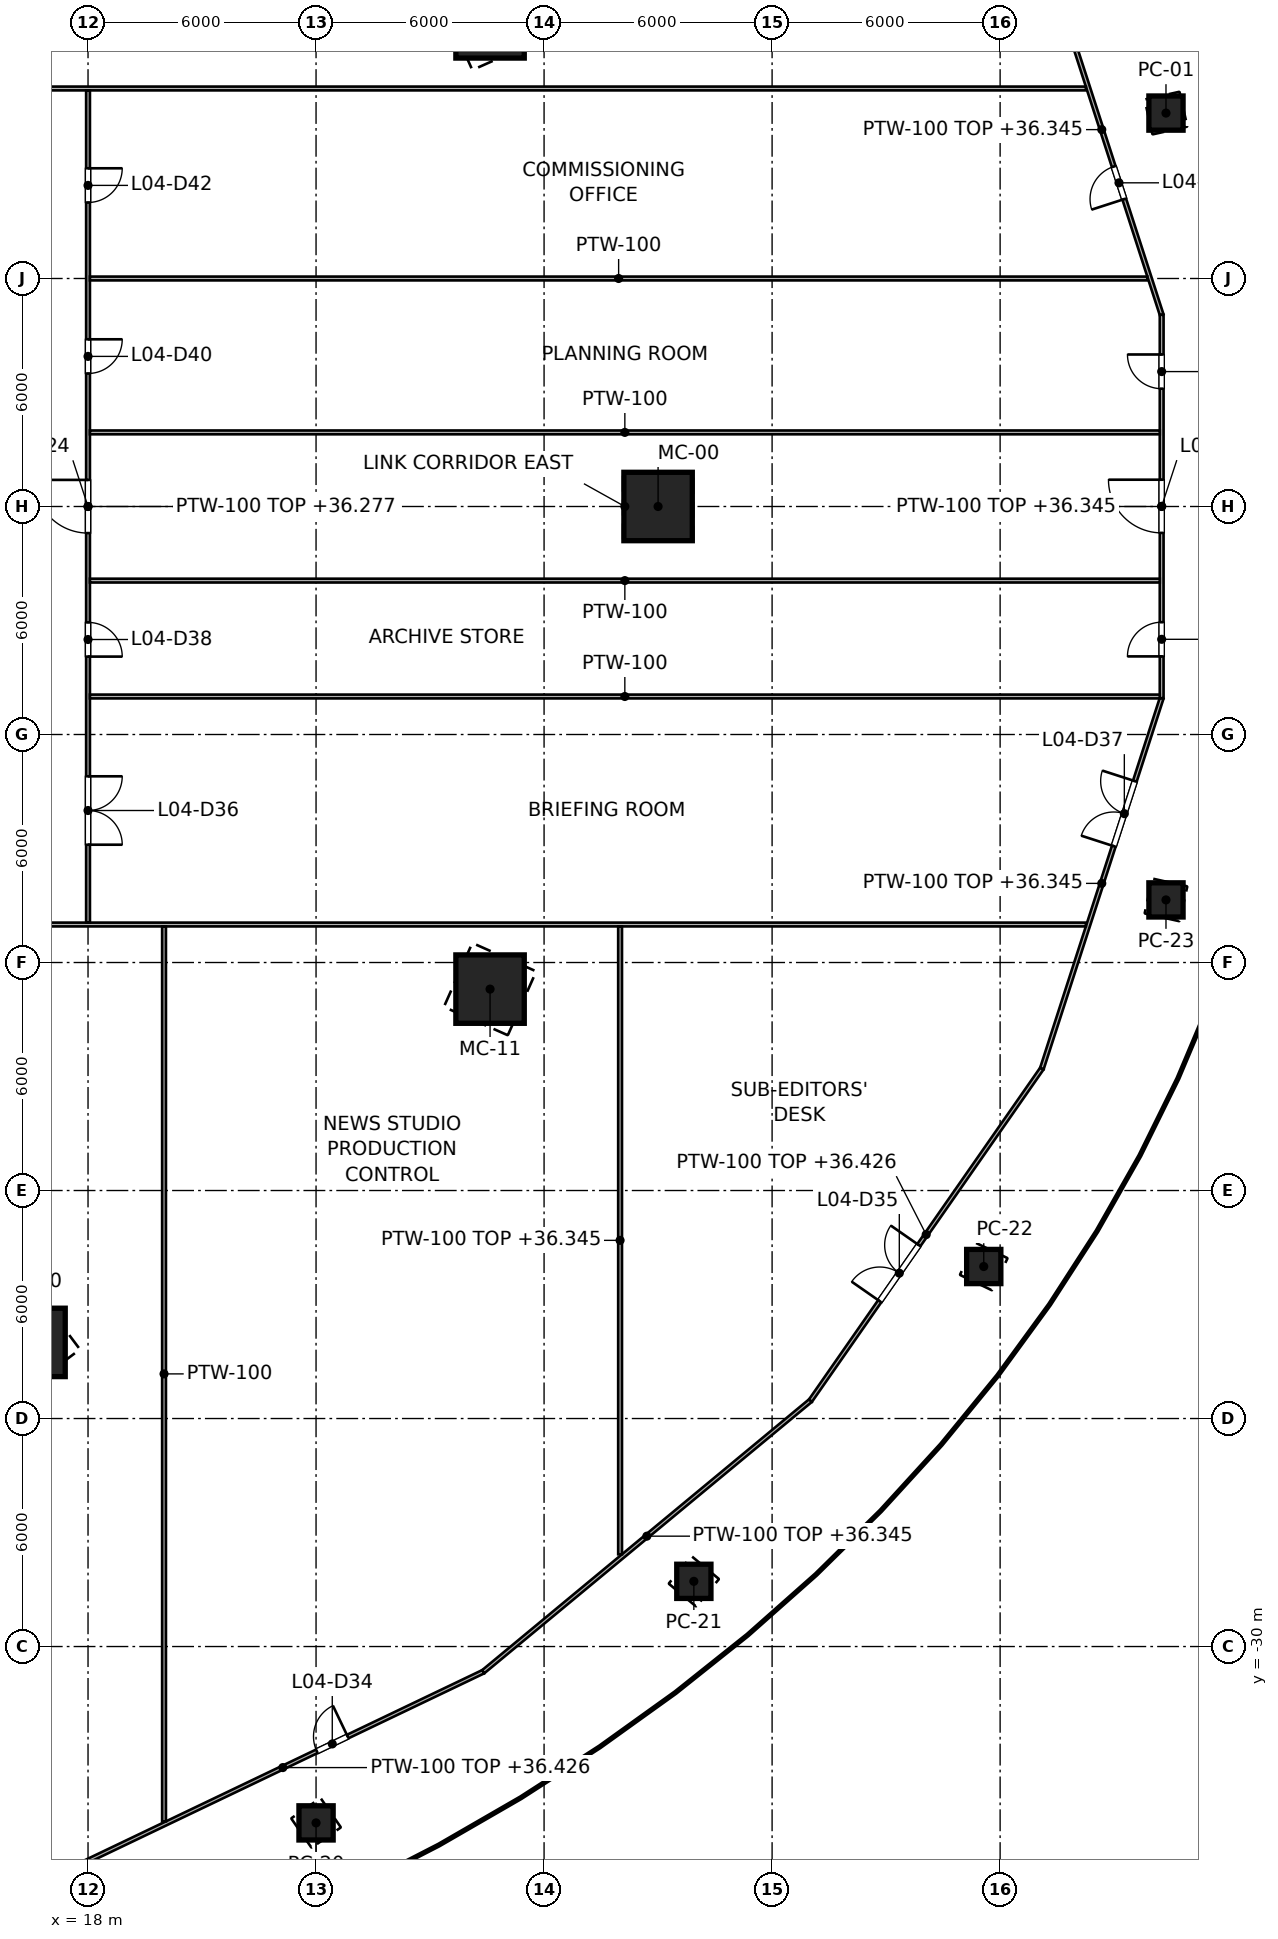
"""IFC4 building model, lengths in metres.
Left out: names, types, materials, properties, quantities, classifications, styles, units other than length and angle.
Written with IfcOpenShell. Run it as: python <this file> out.ifc"""

import sys

from ifc_helpers import new_model, si_unit, direction, frame, frame_2d, origin, origin_2d, place, context, subcontext, project, spatial, rectangle, hollow_rectangle, extrude, element, fill, save


model = new_model("IFC4")
c1 = context("Model", 3, precision=1e-05, world=origin(), true_north=direction((0.0, 1.0)))
c2 = subcontext(c1, "Body", "Model", "MODEL_VIEW")
j1 = project(units=[si_unit("LENGTHUNIT", "METRE"), si_unit("PLANEANGLEUNIT", "RADIAN")], contexts=[c1])
p1 = place(None, origin())
s1 = spatial("IfcSite", under=j1, at=p1, CompositionType="ELEMENT")
p2 = place(p1, origin())
s2 = spatial("IfcBuilding", under=s1, at=p2, CompositionType="ELEMENT")
p3 = place(p2, frame((0.0, 0.0, 31.4)))
s3 = spatial("IfcBuildingStorey", under=s2, at=p3, CompositionType="ELEMENT", Elevation=31.4)
for number, where, z_axis, x_axis in (
    (1, (33.0, 0.0, 0.0), (0.0, 0.0, 1.0), (1.0, 0.0, 0.0)),
    (2, (28.579, 12.7, 0.0), (0.0, 0.0, 1.0), (0.914, 0.406, 0.0)),
    (3, (16.5, -21.997, 0.0), (0.0, 0.0, 1.0), (0.6, -0.8, 0.0)),
    (4, (28.579, -12.7, 0.0), (0.0, 0.0, 1.0), (0.914, -0.406, 0.0)),
):
    element("IfcColumn", number, at=place(p3, frame(where, z_axis=z_axis, x_axis=x_axis)), inside=s3, PredefinedType="COLUMN", context=c2, shape_type="SweptSolid", body=[
        extrude(hollow_rectangle(XDim=1.8, YDim=1.8, WallThickness=0.08, at=origin_2d()), origin(), (0.0, 0.0, 1.0), 6.0),
    ])
for number, where, z_axis, x_axis in (
    (5, (46.365, 10.353, 0.0), (0.0, 0.0, 1.0), (0.976, 0.218, 0.0)),
    (6, (24.0, -34.641, 0.0), (0.0, 0.0, 1.0), (0.569, -0.822, 0.0)),
    (7, (33.941, -28.284, 0.0), (0.0, 0.0, 1.0), (0.768, -0.64, 0.0)),
    (8, (41.569, -20.0, 0.0), (0.0, 0.0, 1.0), (0.901, -0.434, 0.0)),
    (9, (46.365, -10.353, 0.0), (0.0, 0.0, 1.0), (0.976, -0.218, 0.0)),
):
    element("IfcColumn", number, at=place(p3, frame(where, z_axis=z_axis, x_axis=x_axis)), inside=s3, PredefinedType="COLUMN", context=c2, shape_type="SweptSolid", body=[
        extrude(hollow_rectangle(XDim=0.9, YDim=0.9, WallThickness=0.04, at=origin_2d()), origin(), (0.0, 0.0, 1.0), 6.0),
    ])
p4 = place(p3, frame((46.251, 5.045, 0.0), z_axis=(0.0, 0.0, 1.0), x_axis=(-0.307713034182, 0.951479210805, 0.0)))
e10 = element("IfcWall", 10, at=p4, inside=s3, PredefinedType="PARTITIONING", context=c2, shape_type="SweptSolid", body=[
    extrude(rectangle(XDim=10.243, YDim=0.1, at=frame_2d((5.122, 0.0))), origin(), (0.0, 0.0, 1.0), 4.945),
])
p5 = place(p4, frame((3.2, 0.0, 0.0)))
e11 = element("IfcOpeningElement", 11, at=p5, cuts=e10, PredefinedType="OPENING", context=c2, shape_type="SweptSolid", body=[
    extrude(rectangle(XDim=0.9, YDim=2.1, at=frame_2d((0.45, 1.05))), frame((0.0, 0.05, 0.0), z_axis=(0.0, -1.0, 0.0), x_axis=(1.0, 0.0, 0.0)), (0.0, 0.0, 1.0), 0.1),
])
p6 = place(p3, frame((17.852, -35.708, 0.0), z_axis=(0.0, 0.0, 1.0), x_axis=(0.902100999032, 0.431524955878, 0.0)))
e12 = element("IfcWall", 12, at=p6, inside=s3, PredefinedType="PARTITIONING", context=c2, shape_type="SweptSolid", body=[
    extrude(rectangle(XDim=11.691, YDim=0.1, at=frame_2d((5.845, 0.0))), origin(), (0.0, 0.0, 1.0), 5.026),
])
p7 = place(p6, frame((6.838, 0.0, 0.0)))
e13 = element("IfcOpeningElement", 13, at=p7, cuts=e12, PredefinedType="OPENING", context=c2, shape_type="SweptSolid", body=[
    extrude(rectangle(XDim=0.9, YDim=2.1, at=frame_2d((0.45, 1.05))), frame((0.0, 0.05, 0.0), z_axis=(0.0, -1.0, 0.0), x_axis=(1.0, 0.0, 0.0)), (0.0, 0.0, 1.0), 0.1),
])
p8 = place(p3, frame((28.399, -30.663, 0.0), z_axis=(0.0, 0.0, 1.0), x_axis=(0.770046995363, 0.637987166746, 0.0)))
e14 = element("IfcWall", 14, at=p8, inside=s3, PredefinedType="PARTITIONING", context=c2, shape_type="SweptSolid", body=[
    extrude(rectangle(XDim=11.183, YDim=0.1, at=frame_2d((5.591, 0.0))), origin(), (0.0, 0.0, 1.0), 4.945),
])
p9 = place(p3, frame((37.01, -23.529, 0.0), z_axis=(0.0, 0.0, 1.0), x_axis=(0.571737958261, 0.820436290692, 0.0)))
e15 = element("IfcWall", 15, at=p9, inside=s3, PredefinedType="PARTITIONING", context=c2, shape_type="SweptSolid", body=[
    extrude(rectangle(XDim=10.65, YDim=0.1, at=frame_2d((5.325, 0.0))), origin(), (0.0, 0.0, 1.0), 5.026),
])
p10 = place(p9, frame((3.188, 0.0, 0.0)))
e16 = element("IfcOpeningElement", 16, at=p10, cuts=e15, PredefinedType="OPENING", context=c2, shape_type="SweptSolid", body=[
    extrude(rectangle(XDim=1.8, YDim=2.1, at=frame_2d((0.9, 1.05))), frame((0.0, 0.05, 0.0), z_axis=(0.0, -1.0, 0.0), x_axis=(1.0, 0.0, 0.0)), (0.0, 0.0, 1.0), 0.1),
])
p11 = place(p3, frame((43.099, -14.791, 0.0), z_axis=(0.0, 0.0, 1.0), x_axis=(0.307713034182, 0.951479210805, 0.0)))
e17 = element("IfcWall", 17, at=p11, inside=s3, PredefinedType="PARTITIONING", context=c2, shape_type="SweptSolid", body=[
    extrude(rectangle(XDim=10.243, YDim=0.1, at=frame_2d((5.122, 0.0))), origin(), (0.0, 0.0, 1.0), 4.945),
])
p12 = place(p11, frame((6.15, 0.0, 0.0)))
e18 = element("IfcOpeningElement", 18, at=p12, cuts=e17, PredefinedType="OPENING", context=c2, shape_type="SweptSolid", body=[
    extrude(rectangle(XDim=1.8, YDim=2.1, at=frame_2d((0.9, 1.05))), frame((0.0, 0.05, 0.0), z_axis=(0.0, -1.0, 0.0), x_axis=(1.0, 0.0, 0.0)), (0.0, 0.0, 1.0), 0.1),
])
p13 = place(p3, frame((46.251, -5.045, 0.0), z_axis=(0.0, 0.0, 1.0), x_axis=(0.0, 1.0, 0.0)))
e19 = element("IfcWall", 19, at=p13, inside=s3, PredefinedType="PARTITIONING", context=c2, shape_type="SweptSolid", body=[
    extrude(rectangle(XDim=10.09, YDim=0.1, at=frame_2d((5.045, 0.0))), origin(), (0.0, 0.0, 1.0), 4.945),
])
p14 = place(p13, frame((4.35, 0.0, 0.0)))
e20 = element("IfcOpeningElement", 20, at=p14, cuts=e19, PredefinedType="OPENING", context=c2, shape_type="SweptSolid", body=[
    extrude(rectangle(XDim=1.4, YDim=2.1, at=frame_2d((0.7, 1.05))), frame((0.0, 0.05, 0.0), z_axis=(0.0, -1.0, 0.0), x_axis=(1.0, 0.0, 0.0)), (0.0, 0.0, 1.0), 0.1),
])
p15 = place(p13, frame((1.1, 0.0, 0.0)))
e21 = element("IfcOpeningElement", 21, at=p15, cuts=e19, PredefinedType="OPENING", context=c2, shape_type="SweptSolid", body=[
    extrude(rectangle(XDim=0.9, YDim=2.1, at=frame_2d((0.45, 1.05))), frame((0.0, 0.05, 0.0), z_axis=(0.0, -1.0, 0.0), x_axis=(1.0, 0.0, 0.0)), (0.0, 0.0, 1.0), 0.1),
])
p16 = place(p13, frame((8.145, 0.0, 0.0)))
e22 = element("IfcOpeningElement", 22, at=p16, cuts=e19, PredefinedType="OPENING", context=c2, shape_type="SweptSolid", body=[
    extrude(rectangle(XDim=0.9, YDim=2.1, at=frame_2d((0.45, 1.05))), frame((0.0, 0.05, 0.0), z_axis=(0.0, -1.0, 0.0), x_axis=(1.0, 0.0, 0.0)), (0.0, 0.0, 1.0), 0.1),
])
p17 = place(p3, frame((-44.256, 11.0, 0.0), z_axis=(0.0, 0.0, 1.0), x_axis=(1.0, 0.0, 0.0)))
e23 = element("IfcWall", 23, at=p17, inside=s3, PredefinedType="PARTITIONING", context=c2, shape_type="SweptSolid", body=[
    extrude(rectangle(XDim=88.512, YDim=0.1, at=frame_2d((44.256, 0.0))), origin(), (0.0, 0.0, 1.0), 4.868),
])
p18 = place(p17, frame((54.2, 0.0, 0.0)))
e24 = element("IfcOpeningElement", 24, at=p18, cuts=e23, PredefinedType="OPENING", context=c2, shape_type="SweptSolid", body=[
    extrude(rectangle(XDim=1.4, YDim=2.1, at=frame_2d((0.7, 1.05))), frame((0.0, 0.05, 0.0), z_axis=(0.0, -1.0, 0.0), x_axis=(1.0, 0.0, 0.0)), (0.0, 0.0, 1.0), 0.1),
])
p19 = place(p17, frame((32.9, 0.0, 0.0)))
e25 = element("IfcOpeningElement", 25, at=p19, cuts=e23, PredefinedType="OPENING", context=c2, shape_type="SweptSolid", body=[
    extrude(rectangle(XDim=1.4, YDim=2.1, at=frame_2d((0.7, 1.05))), frame((0.0, 0.05, 0.0), z_axis=(0.0, -1.0, 0.0), x_axis=(1.0, 0.0, 0.0)), (0.0, 0.0, 1.0), 0.1),
])
p20 = place(p17, frame((43.35, 0.0, 0.0)))
e26 = element("IfcOpeningElement", 26, at=p20, cuts=e23, PredefinedType="OPENING", context=c2, shape_type="SweptSolid", body=[
    extrude(rectangle(XDim=1.8, YDim=2.1, at=frame_2d((0.9, 1.05))), frame((0.0, 0.05, 0.0), z_axis=(0.0, -1.0, 0.0), x_axis=(1.0, 0.0, 0.0)), (0.0, 0.0, 1.0), 0.1),
])
p21 = place(p3, frame((-44.256, -11.0, 0.0), z_axis=(0.0, 0.0, 1.0), x_axis=(1.0, 0.0, 0.0)))
e27 = element("IfcWall", 27, at=p21, inside=s3, PredefinedType="PARTITIONING", context=c2, shape_type="SweptSolid", body=[
    extrude(rectangle(XDim=88.512, YDim=0.1, at=frame_2d((44.256, 0.0))), origin(), (0.0, 0.0, 1.0), 4.868),
])
p22 = place(p21, frame((32.9, 0.0, 0.0)))
e28 = element("IfcOpeningElement", 28, at=p22, cuts=e27, PredefinedType="OPENING", context=c2, shape_type="SweptSolid", body=[
    extrude(rectangle(XDim=1.4, YDim=2.1, at=frame_2d((0.7, 1.05))), frame((0.0, 0.05, 0.0), z_axis=(0.0, -1.0, 0.0), x_axis=(1.0, 0.0, 0.0)), (0.0, 0.0, 1.0), 0.1),
])
p23 = place(p21, frame((54.2, 0.0, 0.0)))
e29 = element("IfcOpeningElement", 29, at=p23, cuts=e27, PredefinedType="OPENING", context=c2, shape_type="SweptSolid", body=[
    extrude(rectangle(XDim=1.4, YDim=2.1, at=frame_2d((0.7, 1.05))), frame((0.0, 0.05, 0.0), z_axis=(0.0, -1.0, 0.0), x_axis=(1.0, 0.0, 0.0)), (0.0, 0.0, 1.0), 0.1),
])
p24 = place(p21, frame((38.65, 0.0, 0.0)))
e30 = element("IfcOpeningElement", 30, at=p24, cuts=e27, PredefinedType="OPENING", context=c2, shape_type="SweptSolid", body=[
    extrude(rectangle(XDim=1.8, YDim=2.1, at=frame_2d((0.9, 1.05))), frame((0.0, 0.05, 0.0), z_axis=(0.0, -1.0, 0.0), x_axis=(1.0, 0.0, 0.0)), (0.0, 0.0, 1.0), 0.1),
])
p25 = place(p21, frame((48.1, 0.0, 0.0)))
e31 = element("IfcOpeningElement", 31, at=p25, cuts=e27, PredefinedType="OPENING", context=c2, shape_type="SweptSolid", body=[
    extrude(rectangle(XDim=1.8, YDim=2.1, at=frame_2d((0.9, 1.05))), frame((0.0, 0.05, 0.0), z_axis=(0.0, -1.0, 0.0), x_axis=(1.0, 0.0, 0.0)), (0.0, 0.0, 1.0), 0.1),
])
p26 = place(p3, frame((18.0, -10.95, 0.0), z_axis=(0.0, 0.0, 1.0), x_axis=(0.0, 1.0, 0.0)))
e32 = element("IfcWall", 32, at=p26, inside=s3, PredefinedType="PARTITIONING", context=c2, shape_type="SweptSolid", body=[
    extrude(rectangle(XDim=21.9, YDim=0.1, at=frame_2d((10.95, 0.0))), origin(), (0.0, 0.0, 1.0), 4.877),
])
p27 = place(p26, frame((10.25, 0.0, 0.0)))
e33 = element("IfcOpeningElement", 33, at=p27, cuts=e32, PredefinedType="OPENING", context=c2, shape_type="SweptSolid", body=[
    extrude(rectangle(XDim=1.4, YDim=2.1, at=frame_2d((0.7, 1.05))), frame((0.0, 0.05, 0.0), z_axis=(0.0, -1.0, 0.0), x_axis=(1.0, 0.0, 0.0)), (0.0, 0.0, 1.0), 0.1),
])
p28 = place(p26, frame((2.05, 0.0, 0.0)))
e34 = element("IfcOpeningElement", 34, at=p28, cuts=e32, PredefinedType="OPENING", context=c2, shape_type="SweptSolid", body=[
    extrude(rectangle(XDim=1.8, YDim=2.1, at=frame_2d((0.9, 1.05))), frame((0.0, 0.05, 0.0), z_axis=(0.0, -1.0, 0.0), x_axis=(1.0, 0.0, 0.0)), (0.0, 0.0, 1.0), 0.1),
])
p29 = place(p26, frame((7.0, 0.0, 0.0)))
e35 = element("IfcOpeningElement", 35, at=p29, cuts=e32, PredefinedType="OPENING", context=c2, shape_type="SweptSolid", body=[
    extrude(rectangle(XDim=0.9, YDim=2.1, at=frame_2d((0.45, 1.05))), frame((0.0, 0.05, 0.0), z_axis=(0.0, -1.0, 0.0), x_axis=(1.0, 0.0, 0.0)), (0.0, 0.0, 1.0), 0.1),
])
p30 = place(p26, frame((14.45, 0.0, 0.0)))
e36 = element("IfcOpeningElement", 36, at=p30, cuts=e32, PredefinedType="OPENING", context=c2, shape_type="SweptSolid", body=[
    extrude(rectangle(XDim=0.9, YDim=2.1, at=frame_2d((0.45, 1.05))), frame((0.0, 0.05, 0.0), z_axis=(0.0, -1.0, 0.0), x_axis=(1.0, 0.0, 0.0)), (0.0, 0.0, 1.0), 0.1),
])
p31 = place(p26, frame((18.95, 0.0, 0.0)))
e37 = element("IfcOpeningElement", 37, at=p31, cuts=e32, PredefinedType="OPENING", context=c2, shape_type="SweptSolid", body=[
    extrude(rectangle(XDim=0.9, YDim=2.1, at=frame_2d((0.45, 1.05))), frame((0.0, 0.05, 0.0), z_axis=(0.0, -1.0, 0.0), x_axis=(1.0, 0.0, 0.0)), (0.0, 0.0, 1.0), 0.1),
])
p32 = place(p3, frame((20.0, -11.05, 0.0), z_axis=(0.0, 0.0, 1.0), x_axis=(0.0, -1.0, 0.0)))
e38 = element("IfcWall", 38, at=p32, inside=s3, PredefinedType="PARTITIONING", context=c2, shape_type="SweptSolid", body=[
    extrude(rectangle(XDim=23.551, YDim=0.1, at=frame_2d((11.776, 0.0))), origin(), (0.0, 0.0, 1.0), 4.868),
])
p33 = place(p3, frame((32.0, -11.05, 0.0), z_axis=(0.0, 0.0, 1.0), x_axis=(0.0, -1.0, 0.0)))
e39 = element("IfcWall", 39, at=p33, inside=s3, PredefinedType="PARTITIONING", context=c2, shape_type="SweptSolid", body=[
    extrude(rectangle(XDim=16.523, YDim=0.1, at=frame_2d((8.261, 0.0))), origin(), (0.0, 0.0, 1.0), 4.945),
])
p34 = place(p3, frame((18.05, -5.0, 0.0), z_axis=(0.0, 0.0, 1.0), x_axis=(1.0, 0.0, 0.0)))
e40 = element("IfcWall", 40, at=p34, inside=s3, PredefinedType="PARTITIONING", context=c2, shape_type="SweptSolid", body=[
    extrude(rectangle(XDim=28.15, YDim=0.1, at=frame_2d((14.075, 0.0))), origin(), (0.0, 0.0, 1.0), 4.868),
])
p35 = place(p3, frame((18.05, 6.0, 0.0), z_axis=(0.0, 0.0, 1.0), x_axis=(1.0, 0.0, 0.0)))
e41 = element("IfcWall", 41, at=p35, inside=s3, PredefinedType="PARTITIONING", context=c2, shape_type="SweptSolid", body=[
    extrude(rectangle(XDim=27.823, YDim=0.1, at=frame_2d((13.912, 0.0))), origin(), (0.0, 0.0, 1.0), 4.868),
])
for number, where, z_axis, x_axis in (
    (42, (18.05, -1.95, 0.0), (0.0, 0.0, 1.0), (1.0, 0.0, 0.0)),
    (43, (18.05, 1.95, 0.0), (0.0, 0.0, 1.0), (1.0, 0.0, 0.0)),
):
    element("IfcWall", number, at=place(p3, frame(where, z_axis=z_axis, x_axis=x_axis)), inside=s3, PredefinedType="PARTITIONING", context=c2, shape_type="SweptSolid", body=[
        extrude(rectangle(XDim=28.151, YDim=0.1, at=frame_2d((14.075, 0.0))), origin(), (0.0, 0.0, 1.0), 4.868),
    ])
p36 = place(p27, origin())
e44 = element("IfcDoor", 44, at=p36, inside=s3, OperationType="SINGLE_SWING_RIGHT", PredefinedType="DOOR", context=c2, shape_type="SweptSolid", body=[
    extrude(rectangle(XDim=1.4, YDim=2.1, at=frame_2d((0.7, 1.05))), frame((0.0, 0.025, 0.0), z_axis=(0.0, -1.0, 0.0), x_axis=(1.0, 0.0, 0.0)), (0.0, 0.0, 1.0), 0.05),
])
fill(e33, e44)
p37 = place(p14, origin())
e45 = element("IfcDoor", 45, at=p37, inside=s3, OperationType="SINGLE_SWING_RIGHT", PredefinedType="DOOR", context=c2, shape_type="SweptSolid", body=[
    extrude(rectangle(XDim=1.4, YDim=2.1, at=frame_2d((0.7, 1.05))), frame((0.0, 0.025, 0.0), z_axis=(0.0, -1.0, 0.0), x_axis=(1.0, 0.0, 0.0)), (0.0, 0.0, 1.0), 0.05),
])
fill(e20, e45)
p38 = place(p7, origin())
e46 = element("IfcDoor", 46, at=p38, inside=s3, OperationType="SINGLE_SWING_RIGHT", PredefinedType="DOOR", context=c2, shape_type="SweptSolid", body=[
    extrude(rectangle(XDim=0.9, YDim=2.1, at=frame_2d((0.45, 1.05))), frame((0.0, 0.025, 0.0), z_axis=(0.0, -1.0, 0.0), x_axis=(1.0, 0.0, 0.0)), (0.0, 0.0, 1.0), 0.05),
])
fill(e13, e46)
p39 = place(p10, origin())
e47 = element("IfcDoor", 47, at=p39, inside=s3, OperationType="DOUBLE_DOOR_SINGLE_SWING", PredefinedType="DOOR", context=c2, shape_type="SweptSolid", body=[
    extrude(rectangle(XDim=1.8, YDim=2.1, at=frame_2d((0.9, 1.05))), frame((0.0, 0.025, 0.0), z_axis=(0.0, -1.0, 0.0), x_axis=(1.0, 0.0, 0.0)), (0.0, 0.0, 1.0), 0.05),
])
fill(e16, e47)
p40 = place(p28, origin())
e48 = element("IfcDoor", 48, at=p40, inside=s3, OperationType="DOUBLE_DOOR_SINGLE_SWING", PredefinedType="DOOR", context=c2, shape_type="SweptSolid", body=[
    extrude(rectangle(XDim=1.8, YDim=2.1, at=frame_2d((0.9, 1.05))), frame((0.0, 0.025, 0.0), z_axis=(0.0, -1.0, 0.0), x_axis=(1.0, 0.0, 0.0)), (0.0, 0.0, 1.0), 0.05),
])
fill(e34, e48)
p41 = place(p12, origin())
e49 = element("IfcDoor", 49, at=p41, inside=s3, OperationType="DOUBLE_DOOR_SINGLE_SWING", PredefinedType="DOOR", context=c2, shape_type="SweptSolid", body=[
    extrude(rectangle(XDim=1.8, YDim=2.1, at=frame_2d((0.9, 1.05))), frame((0.0, 0.025, 0.0), z_axis=(0.0, -1.0, 0.0), x_axis=(1.0, 0.0, 0.0)), (0.0, 0.0, 1.0), 0.05),
])
fill(e18, e49)
p42 = place(p29, origin())
e50 = element("IfcDoor", 50, at=p42, inside=s3, OperationType="SINGLE_SWING_LEFT", PredefinedType="DOOR", context=c2, shape_type="SweptSolid", body=[
    extrude(rectangle(XDim=0.9, YDim=2.1, at=frame_2d((0.45, 1.05))), frame((0.0, 0.025, 0.0), z_axis=(0.0, -1.0, 0.0), x_axis=(1.0, 0.0, 0.0)), (0.0, 0.0, 1.0), 0.05),
])
fill(e35, e50)
p43 = place(p15, origin())
e51 = element("IfcDoor", 51, at=p43, inside=s3, OperationType="SINGLE_SWING_LEFT", PredefinedType="DOOR", context=c2, shape_type="SweptSolid", body=[
    extrude(rectangle(XDim=0.9, YDim=2.1, at=frame_2d((0.45, 1.05))), frame((0.0, 0.025, 0.0), z_axis=(0.0, -1.0, 0.0), x_axis=(1.0, 0.0, 0.0)), (0.0, 0.0, 1.0), 0.05),
])
fill(e21, e51)
p44 = place(p30, origin())
e52 = element("IfcDoor", 52, at=p44, inside=s3, OperationType="SINGLE_SWING_RIGHT", PredefinedType="DOOR", context=c2, shape_type="SweptSolid", body=[
    extrude(rectangle(XDim=0.9, YDim=2.1, at=frame_2d((0.45, 1.05))), frame((0.0, 0.025, 0.0), z_axis=(0.0, -1.0, 0.0), x_axis=(1.0, 0.0, 0.0)), (0.0, 0.0, 1.0), 0.05),
])
fill(e36, e52)
p45 = place(p16, origin())
e53 = element("IfcDoor", 53, at=p45, inside=s3, OperationType="SINGLE_SWING_RIGHT", PredefinedType="DOOR", context=c2, shape_type="SweptSolid", body=[
    extrude(rectangle(XDim=0.9, YDim=2.1, at=frame_2d((0.45, 1.05))), frame((0.0, 0.025, 0.0), z_axis=(0.0, -1.0, 0.0), x_axis=(1.0, 0.0, 0.0)), (0.0, 0.0, 1.0), 0.05),
])
fill(e22, e53)
p46 = place(p31, origin())
e54 = element("IfcDoor", 54, at=p46, inside=s3, OperationType="SINGLE_SWING_RIGHT", PredefinedType="DOOR", context=c2, shape_type="SweptSolid", body=[
    extrude(rectangle(XDim=0.9, YDim=2.1, at=frame_2d((0.45, 1.05))), frame((0.0, 0.025, 0.0), z_axis=(0.0, -1.0, 0.0), x_axis=(1.0, 0.0, 0.0)), (0.0, 0.0, 1.0), 0.05),
])
fill(e37, e54)
p47 = place(p5, origin())
e55 = element("IfcDoor", 55, at=p47, inside=s3, OperationType="SINGLE_SWING_LEFT", PredefinedType="DOOR", context=c2, shape_type="SweptSolid", body=[
    extrude(rectangle(XDim=0.9, YDim=2.1, at=frame_2d((0.45, 1.05))), frame((0.0, 0.025, 0.0), z_axis=(0.0, -1.0, 0.0), x_axis=(1.0, 0.0, 0.0)), (0.0, 0.0, 1.0), 0.05),
])
fill(e11, e55)
save(model, sys.argv[1])
